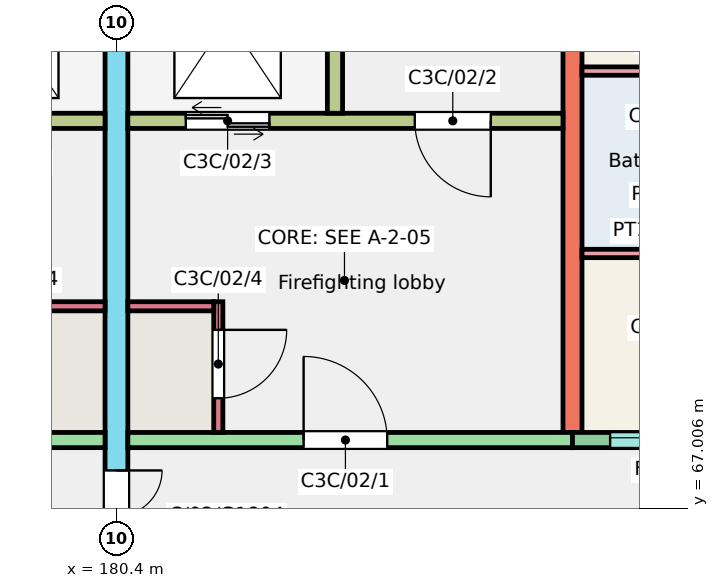
"""IFC4 building model, lengths in metres.
Left out: names, types, materials, properties, quantities, classifications, styles, units other than length and angle.
Written with IfcOpenShell. Run it as: python <this file> out.ifc"""

import sys

from ifc_helpers import new_model, si_unit, direction, frame, frame_2d, origin, place, context, subcontext, project, spatial, rectangle, extrude, element, fill, save


model = new_model("IFC4")
c1 = context("Model", 3, precision=1e-05, world=origin(), true_north=direction((0.0, 1.0)))
c2 = subcontext(c1, "Body", "Model", "MODEL_VIEW")
j1 = project(units=[si_unit("LENGTHUNIT", "METRE"), si_unit("PLANEANGLEUNIT", "RADIAN")], contexts=[c1])
p1 = place(None, origin())
s1 = spatial("IfcSite", under=j1, at=p1, CompositionType="ELEMENT")
p2 = place(p1, origin())
s2 = spatial("IfcBuilding", under=s1, at=p2, CompositionType="ELEMENT")
p3 = place(p2, frame((0.0, 0.0, 6.0)))
s3 = spatial("IfcBuildingStorey", under=s2, at=p3, CompositionType="ELEMENT", Elevation=6.0)
p4 = place(p3, frame((180.4, 66.0, 0.0), z_axis=(0.0, 0.0, 1.0), x_axis=(0.0, 1.0, 0.0)))
e1 = element("IfcWall", 1, at=p4, inside=s3, PredefinedType="SHEAR", context=c2, shape_type="SweptSolid", body=[
    extrude(rectangle(XDim=11.0, YDim=0.3, at=frame_2d((5.5, 0.0))), origin(), (0.0, 0.0, 1.0), 3.0),
])
p5 = place(p4, frame((0.3, 0.0, 0.0)))
e2 = element("IfcOpeningElement", 2, at=p5, cuts=e1, PredefinedType="OPENING", context=c2, shape_type="SweptSolid", body=[
    extrude(rectangle(XDim=1.2, YDim=2.1, at=frame_2d((0.6, 1.05))), frame((0.0, 0.16, 0.0), z_axis=(0.0, -1.0, 0.0), x_axis=(1.0, 0.0, 0.0)), (0.0, 0.0, 1.0), 0.32),
])
p6 = place(p3, frame((186.4, 68.0, 0.0), z_axis=(0.0, 0.0, 1.0), x_axis=(0.0, 1.0, 0.0)))
e3 = element("IfcWall", 3, at=p6, inside=s3, PredefinedType="SHEAR", context=c2, shape_type="SweptSolid", body=[
    extrude(rectangle(XDim=9.0, YDim=0.25, at=frame_2d((4.5, 0.0))), origin(), (0.0, 0.0, 1.0), 3.0),
])
p7 = place(p3, frame((174.4, 67.9, 0.0), z_axis=(0.0, 0.0, 1.0), x_axis=(1.0, 0.0, 0.0)))
e4 = element("IfcWall", 4, at=p7, inside=s3, PredefinedType="SHEAR", context=c2, shape_type="SweptSolid", body=[
    extrude(rectangle(XDim=5.85, YDim=0.2, at=frame_2d((2.925, 0.0))), origin(), (0.0, 0.0, 1.0), 3.0),
])
p8 = place(p7, frame((2.438, 0.0, 0.0)))
e5 = element("IfcOpeningElement", 5, at=p8, cuts=e4, PredefinedType="OPENING", context=c2, shape_type="SweptSolid", body=[
    extrude(rectangle(XDim=1.1, YDim=2.1, at=frame_2d((0.55, 1.05))), frame((0.0, 0.11, 0.0), z_axis=(0.0, -1.0, 0.0), x_axis=(1.0, 0.0, 0.0)), (0.0, 0.0, 1.0), 0.22),
])
p9 = place(p3, frame((174.525, 72.1, 0.0), z_axis=(0.0, 0.0, 1.0), x_axis=(1.0, 0.0, 0.0)))
e6 = element("IfcWall", 6, at=p9, inside=s3, PredefinedType="SHEAR", context=c2, shape_type="SweptSolid", body=[
    extrude(rectangle(XDim=5.725, YDim=0.2, at=frame_2d((2.863, 0.0))), origin(), (0.0, 0.0, 1.0), 3.0),
])
p10 = place(p9, frame((0.95, 0.0, 0.0)))
e7 = element("IfcOpeningElement", 7, at=p10, cuts=e6, PredefinedType="OPENING", context=c2, shape_type="SweptSolid", body=[
    extrude(rectangle(XDim=1.0, YDim=2.1, at=frame_2d((0.5, 1.05))), frame((0.0, 0.11, 0.0), z_axis=(0.0, -1.0, 0.0), x_axis=(1.0, 0.0, 0.0)), (0.0, 0.0, 1.0), 0.22),
])
p11 = place(p9, frame((3.863, 0.0, 0.0)))
e8 = element("IfcOpeningElement", 8, at=p11, cuts=e6, PredefinedType="OPENING", context=c2, shape_type="SweptSolid", body=[
    extrude(rectangle(XDim=1.1, YDim=2.1, at=frame_2d((0.55, 1.05))), frame((0.0, 0.11, 0.0), z_axis=(0.0, -1.0, 0.0), x_axis=(1.0, 0.0, 0.0)), (0.0, 0.0, 1.0), 0.22),
])
p12 = place(p3, frame((179.12, 69.66, 0.0), z_axis=(0.0, 0.0, 1.0), x_axis=(1.0, 0.0, 0.0)))
e9 = element("IfcWall", 9, at=p12, inside=s3, PredefinedType="SHEAR", context=c2, shape_type="SweptSolid", body=[
    extrude(rectangle(XDim=1.13, YDim=0.12, at=frame_2d((0.565, 0.0))), origin(), (0.0, 0.0, 1.0), 3.0),
])
p13 = place(p3, frame((180.55, 67.9, 0.0), z_axis=(0.0, 0.0, 1.0), x_axis=(1.0, 0.0, 0.0)))
e10 = element("IfcWall", 10, at=p13, inside=s3, PredefinedType="SHEAR", context=c2, shape_type="SweptSolid", body=[
    extrude(rectangle(XDim=5.85, YDim=0.2, at=frame_2d((2.925, 0.0))), origin(), (0.0, 0.0, 1.0), 3.0),
])
p14 = place(p13, frame((2.312, 0.0, 0.0)))
e11 = element("IfcOpeningElement", 11, at=p14, cuts=e10, PredefinedType="OPENING", context=c2, shape_type="SweptSolid", body=[
    extrude(rectangle(XDim=1.1, YDim=2.1, at=frame_2d((0.55, 1.05))), frame((0.0, 0.11, 0.0), z_axis=(0.0, -1.0, 0.0), x_axis=(1.0, 0.0, 0.0)), (0.0, 0.0, 1.0), 0.22),
])
p15 = place(p3, frame((180.55, 72.1, 0.0), z_axis=(0.0, 0.0, 1.0), x_axis=(1.0, 0.0, 0.0)))
e12 = element("IfcWall", 12, at=p15, inside=s3, PredefinedType="SHEAR", context=c2, shape_type="SweptSolid", body=[
    extrude(rectangle(XDim=5.725, YDim=0.2, at=frame_2d((2.862, 0.0))), origin(), (0.0, 0.0, 1.0), 3.0),
])
p16 = place(p15, frame((3.775, 0.0, 0.0)))
e13 = element("IfcOpeningElement", 13, at=p16, cuts=e12, PredefinedType="OPENING", context=c2, shape_type="SweptSolid", body=[
    extrude(rectangle(XDim=1.0, YDim=2.1, at=frame_2d((0.5, 1.05))), frame((0.0, 0.11, 0.0), z_axis=(0.0, -1.0, 0.0), x_axis=(1.0, 0.0, 0.0)), (0.0, 0.0, 1.0), 0.22),
])
p17 = place(p15, frame((0.762, 0.0, 0.0)))
e14 = element("IfcOpeningElement", 14, at=p17, cuts=e12, PredefinedType="OPENING", context=c2, shape_type="SweptSolid", body=[
    extrude(rectangle(XDim=1.1, YDim=2.1, at=frame_2d((0.55, 1.05))), frame((0.0, 0.11, 0.0), z_axis=(0.0, -1.0, 0.0), x_axis=(1.0, 0.0, 0.0)), (0.0, 0.0, 1.0), 0.22),
])
p18 = place(p3, frame((183.275, 72.2, 0.0), z_axis=(0.0, 0.0, 1.0), x_axis=(0.0, 1.0, 0.0)))
e15 = element("IfcWall", 15, at=p18, inside=s3, PredefinedType="SHEAR", context=c2, shape_type="SweptSolid", body=[
    extrude(rectangle(XDim=4.8, YDim=0.2, at=frame_2d((2.4, 0.0))), origin(), (0.0, 0.0, 1.0), 3.0),
])
p19 = place(p3, frame((181.74, 68.0, 0.0), z_axis=(0.0, 0.0, 1.0), x_axis=(0.0, 1.0, 0.0)))
e16 = element("IfcWall", 16, at=p19, inside=s3, PredefinedType="SHEAR", context=c2, shape_type="SweptSolid", body=[
    extrude(rectangle(XDim=1.72, YDim=0.12, at=frame_2d((0.86, 0.0))), origin(), (0.0, 0.0, 1.0), 3.0),
])
p20 = place(p19, frame((0.45, 0.0, 0.0)))
e17 = element("IfcOpeningElement", 17, at=p20, cuts=e16, PredefinedType="OPENING", context=c2, shape_type="SweptSolid", body=[
    extrude(rectangle(XDim=0.9, YDim=2.1, at=frame_2d((0.45, 1.05))), frame((0.0, 0.07, 0.0), z_axis=(0.0, -1.0, 0.0), x_axis=(1.0, 0.0, 0.0)), (0.0, 0.0, 1.0), 0.14),
])
p21 = place(p3, frame((180.55, 69.66, 0.0), z_axis=(0.0, 0.0, 1.0), x_axis=(1.0, 0.0, 0.0)))
e18 = element("IfcWall", 18, at=p21, inside=s3, PredefinedType="SHEAR", context=c2, shape_type="SweptSolid", body=[
    extrude(rectangle(XDim=1.13, YDim=0.12, at=frame_2d((0.565, 0.0))), origin(), (0.0, 0.0, 1.0), 3.0),
])
p22 = place(p3, frame((186.4, 67.9, 0.0), z_axis=(0.0, 0.0, 1.0), x_axis=(1.0, 0.0, 0.0)))
e19 = element("IfcWall", 19, at=p22, inside=s3, PredefinedType="SOLIDWALL", context=c2, shape_type="SweptSolid", body=[
    extrude(rectangle(XDim=3.6, YDim=0.2, at=frame_2d((1.8, 0.0))), origin(), (0.0, 0.0, 1.0), 3.0),
])
p23 = place(p22, frame((0.495, 0.0, 1.1)))
e20 = element("IfcOpeningElement", 20, at=p23, cuts=e19, PredefinedType="OPENING", context=c2, shape_type="SweptSolid", body=[
    extrude(rectangle(XDim=1.2, YDim=1.3, at=frame_2d((0.6, 0.65))), frame((0.0, 0.11, 0.0), z_axis=(0.0, -1.0, 0.0), x_axis=(1.0, 0.0, 0.0)), (0.0, 0.0, 1.0), 0.22),
])
p24 = place(p22, frame((2.325, 0.0, 0.0)))
e21 = element("IfcOpeningElement", 21, at=p24, cuts=e19, PredefinedType="OPENING", context=c2, shape_type="SweptSolid", body=[
    extrude(rectangle(XDim=1.0, YDim=2.1, at=frame_2d((0.5, 1.05))), frame((0.0, 0.11, 0.0), z_axis=(0.0, -1.0, 0.0), x_axis=(1.0, 0.0, 0.0)), (0.0, 0.0, 1.0), 0.22),
])
p25 = place(p3, frame((186.525, 70.355, 0.0), z_axis=(0.0, 0.0, 1.0), x_axis=(1.0, 0.0, 0.0)))
e22 = element("IfcWall", 22, at=p25, inside=s3, PredefinedType="PARTITIONING", context=c2, shape_type="SweptSolid", body=[
    extrude(rectangle(XDim=1.94, YDim=0.11, at=frame_2d((0.97, 0.0))), origin(), (0.0, 0.0, 1.0), 2.8),
])
p26 = place(p3, frame((186.525, 72.755, 0.0), z_axis=(0.0, 0.0, 1.0), x_axis=(1.0, 0.0, 0.0)))
e23 = element("IfcWall", 23, at=p26, inside=s3, PredefinedType="PARTITIONING", context=c2, shape_type="SweptSolid", body=[
    extrude(rectangle(XDim=3.35, YDim=0.11, at=frame_2d((1.675, 0.0))), origin(), (0.0, 0.0, 1.0), 2.8),
])
p27 = place(p26, frame((2.25, 0.0, 0.0)))
e24 = element("IfcOpeningElement", 24, at=p27, cuts=e23, PredefinedType="OPENING", context=c2, shape_type="SweptSolid", body=[
    extrude(rectangle(XDim=0.9, YDim=2.1, at=frame_2d((0.45, 1.05))), frame((0.0, 0.065, 0.0), z_axis=(0.0, -1.0, 0.0), x_axis=(1.0, 0.0, 0.0)), (0.0, 0.0, 1.0), 0.13),
])
p28 = place(p23, origin())
e25 = element("IfcWindow", 25, at=p28, inside=s3, PartitioningType="SINGLE_PANEL", PredefinedType="WINDOW", context=c2, shape_type="SweptSolid", body=[
    extrude(rectangle(XDim=1.2, YDim=1.3, at=frame_2d((0.6, 0.65))), frame((0.0, 0.06, 0.0), z_axis=(0.0, -1.0, 0.0), x_axis=(1.0, 0.0, 0.0)), (0.0, 0.0, 1.0), 0.06),
])
fill(e20, e25)
p29 = place(p14, origin())
e26 = element("IfcDoor", 26, at=p29, inside=s3, OperationType="SINGLE_SWING_LEFT", PredefinedType="DOOR", context=c2, shape_type="SweptSolid", body=[
    extrude(rectangle(XDim=1.1, YDim=2.1, at=frame_2d((0.55, 1.05))), frame((0.0, 0.025, 0.0), z_axis=(0.0, -1.0, 0.0), x_axis=(1.0, 0.0, 0.0)), (0.0, 0.0, 1.0), 0.05),
])
fill(e11, e26)
p30 = place(p16, origin())
e27 = element("IfcDoor", 27, at=p30, inside=s3, OperationType="SINGLE_SWING_RIGHT", PredefinedType="DOOR", context=c2, shape_type="SweptSolid", body=[
    extrude(rectangle(XDim=1.0, YDim=2.1, at=frame_2d((0.5, 1.05))), frame((0.0, 0.025, 0.0), z_axis=(0.0, -1.0, 0.0), x_axis=(1.0, 0.0, 0.0)), (0.0, 0.0, 1.0), 0.05),
])
fill(e13, e27)
p31 = place(p17, origin())
e28 = element("IfcDoor", 28, at=p31, inside=s3, OperationType="DOUBLE_DOOR_SLIDING", PredefinedType="DOOR", context=c2, shape_type="SweptSolid", body=[
    extrude(rectangle(XDim=1.1, YDim=2.1, at=frame_2d((0.55, 1.05))), frame((0.0, 0.025, 0.0), z_axis=(0.0, -1.0, 0.0), x_axis=(1.0, 0.0, 0.0)), (0.0, 0.0, 1.0), 0.05),
])
fill(e14, e28)
p32 = place(p20, origin())
e29 = element("IfcDoor", 29, at=p32, inside=s3, OperationType="SINGLE_SWING_RIGHT", PredefinedType="DOOR", context=c2, shape_type="SweptSolid", body=[
    extrude(rectangle(XDim=0.9, YDim=2.1, at=frame_2d((0.45, 1.05))), frame((0.0, 0.025, 0.0), z_axis=(0.0, -1.0, 0.0), x_axis=(1.0, 0.0, 0.0)), (0.0, 0.0, 1.0), 0.05),
])
fill(e17, e29)
p33 = place(p5, origin())
e30 = element("IfcDoor", 30, at=p33, inside=s3, OperationType="DOUBLE_DOOR_SINGLE_SWING", PredefinedType="DOOR", context=c2, shape_type="SweptSolid", body=[
    extrude(rectangle(XDim=1.2, YDim=2.1, at=frame_2d((0.6, 1.05))), frame((0.0, 0.025, 0.0), z_axis=(0.0, -1.0, 0.0), x_axis=(1.0, 0.0, 0.0)), (0.0, 0.0, 1.0), 0.05),
])
fill(e2, e30)
save(model, sys.argv[1])
